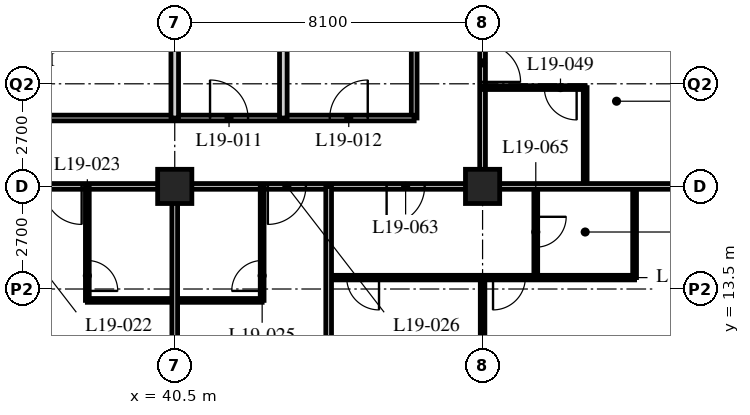
"""IFC4 building model, lengths in metres.
Left out: names, types, materials, properties, quantities, classifications, styles, units other than length and angle.
Written with IfcOpenShell. Run it as: python <this file> out.ifc"""

import sys

from ifc_helpers import new_model, si_unit, direction, frame, frame_2d, origin, origin_2d, place, context, subcontext, project, spatial, rectangle, hollow_rectangle, extrude, element, fill, save


model = new_model("IFC4")
c1 = context("Model", 3, precision=1e-05, world=origin(), true_north=direction((0.0, 1.0)))
c2 = subcontext(c1, "Body", "Model", "MODEL_VIEW")
j1 = project(units=[si_unit("LENGTHUNIT", "METRE"), si_unit("PLANEANGLEUNIT", "RADIAN")], contexts=[c1])
p1 = place(None, origin())
s1 = spatial("IfcSite", under=j1, at=p1, CompositionType="ELEMENT")
p2 = place(p1, origin())
s2 = spatial("IfcBuilding", under=s1, at=p2, CompositionType="ELEMENT")
p3 = place(p2, frame((0.0, 0.0, 77.2)))
s3 = spatial("IfcBuildingStorey", under=s2, at=p3, CompositionType="ELEMENT", Elevation=77.2)
for number, where, z_axis, x_axis in (
    (1, (40.5, 16.2, 0.0), (0.0, 0.0, 1.0), (1.0, 0.0, 0.0)),
    (2, (48.6, 16.2, 0.0), (0.0, 0.0, 1.0), (1.0, 0.0, 0.0)),
):
    element("IfcColumn", number, at=place(p3, frame(where, z_axis=z_axis, x_axis=x_axis)), inside=s3, PredefinedType="COLUMN", context=c2, shape_type="SweptSolid", body=[
        extrude(hollow_rectangle(XDim=0.9, YDim=0.9, WallThickness=0.09, at=origin_2d()), origin(), (0.0, 0.0, 1.0), 3.4),
    ])
p4 = place(p3, frame((12.15, 16.2, 0.0), z_axis=(0.0, 0.0, 1.0), x_axis=(1.0, 0.0, 0.0)))
e3 = element("IfcWall", 3, at=p4, inside=s3, PredefinedType="PARTITIONING", context=c2, shape_type="SweptSolid", body=[
    extrude(rectangle(XDim=36.45, YDim=0.15, at=frame_2d((18.225, 0.0))), origin(), (0.0, 0.0, 1.0), 2.428),
])
p5 = place(p4, frame((6.5, 0.0, 0.0)))
e4 = element("IfcOpeningElement", 4, at=p5, cuts=e3, PredefinedType="OPENING", context=c2, shape_type="SweptSolid", body=[
    extrude(rectangle(XDim=1.0, YDim=2.1, at=frame_2d((0.5, 1.05))), frame((0.0, 0.085, 0.0), z_axis=(0.0, -1.0, 0.0), x_axis=(1.0, 0.0, 0.0)), (0.0, 0.0, 1.0), 0.17),
])
p6 = place(p4, frame((8.4, 0.0, 0.0)))
e5 = element("IfcOpeningElement", 5, at=p6, cuts=e3, PredefinedType="OPENING", context=c2, shape_type="SweptSolid", body=[
    extrude(rectangle(XDim=1.0, YDim=2.1, at=frame_2d((0.5, 1.05))), frame((0.0, 0.085, 0.0), z_axis=(0.0, -1.0, 0.0), x_axis=(1.0, 0.0, 0.0)), (0.0, 0.0, 1.0), 0.17),
])
p7 = place(p4, frame((14.9, 0.0, 0.0)))
e6 = element("IfcOpeningElement", 6, at=p7, cuts=e3, PredefinedType="OPENING", context=c2, shape_type="SweptSolid", body=[
    extrude(rectangle(XDim=1.0, YDim=2.1, at=frame_2d((0.5, 1.05))), frame((0.0, 0.085, 0.0), z_axis=(0.0, -1.0, 0.0), x_axis=(1.0, 0.0, 0.0)), (0.0, 0.0, 1.0), 0.17),
])
p8 = place(p4, frame((16.5, 0.0, 0.0)))
e7 = element("IfcOpeningElement", 7, at=p8, cuts=e3, PredefinedType="OPENING", context=c2, shape_type="SweptSolid", body=[
    extrude(rectangle(XDim=1.0, YDim=2.1, at=frame_2d((0.5, 1.05))), frame((0.0, 0.085, 0.0), z_axis=(0.0, -1.0, 0.0), x_axis=(1.0, 0.0, 0.0)), (0.0, 0.0, 1.0), 0.17),
])
p9 = place(p4, frame((22.7, 0.0, 0.0)))
e8 = element("IfcOpeningElement", 8, at=p9, cuts=e3, PredefinedType="OPENING", context=c2, shape_type="SweptSolid", body=[
    extrude(rectangle(XDim=1.0, YDim=2.1, at=frame_2d((0.5, 1.05))), frame((0.0, 0.085, 0.0), z_axis=(0.0, -1.0, 0.0), x_axis=(1.0, 0.0, 0.0)), (0.0, 0.0, 1.0), 0.17),
])
p10 = place(p4, frame((24.9, 0.0, 0.0)))
e9 = element("IfcOpeningElement", 9, at=p10, cuts=e3, PredefinedType="OPENING", context=c2, shape_type="SweptSolid", body=[
    extrude(rectangle(XDim=1.0, YDim=2.1, at=frame_2d((0.5, 1.05))), frame((0.0, 0.085, 0.0), z_axis=(0.0, -1.0, 0.0), x_axis=(1.0, 0.0, 0.0)), (0.0, 0.0, 1.0), 0.17),
])
p11 = place(p4, frame((30.8, 0.0, 0.0)))
e10 = element("IfcOpeningElement", 10, at=p11, cuts=e3, PredefinedType="OPENING", context=c2, shape_type="SweptSolid", body=[
    extrude(rectangle(XDim=1.0, YDim=2.1, at=frame_2d((0.5, 1.05))), frame((0.0, 0.085, 0.0), z_axis=(0.0, -1.0, 0.0), x_axis=(1.0, 0.0, 0.0)), (0.0, 0.0, 1.0), 0.17),
])
p12 = place(p4, frame((1.525, 0.0, 0.0)))
e11 = element("IfcOpeningElement", 11, at=p12, cuts=e3, PredefinedType="OPENING", context=c2, shape_type="SweptSolid", body=[
    extrude(rectangle(XDim=1.0, YDim=2.1, at=frame_2d((0.5, 1.05))), frame((0.0, 0.085, 0.0), z_axis=(0.0, -1.0, 0.0), x_axis=(1.0, 0.0, 0.0)), (0.0, 0.0, 1.0), 0.17),
])
p13 = place(p4, frame((33.925, 0.0, 0.0)))
e12 = element("IfcOpeningElement", 12, at=p13, cuts=e3, PredefinedType="OPENING", context=c2, shape_type="SweptSolid", body=[
    extrude(rectangle(XDim=1.0, YDim=2.1, at=frame_2d((0.5, 1.05))), frame((0.0, 0.085, 0.0), z_axis=(0.0, -1.0, 0.0), x_axis=(1.0, 0.0, 0.0)), (0.0, 0.0, 1.0), 0.17),
])
p14 = place(p3, frame((48.6, 16.2, 0.0), z_axis=(0.0, 0.0, 1.0), x_axis=(0.0, 1.0, 0.0)))
e13 = element("IfcWall", 13, at=p14, inside=s3, PredefinedType="PARTITIONING", context=c2, shape_type="SweptSolid", body=[
    extrude(rectangle(XDim=26.1, YDim=0.15, at=frame_2d((13.05, 0.0))), origin(), (0.0, 0.0, 1.0), 2.428),
])
p15 = place(p14, frame((2.75, 0.0, 0.0)))
e14 = element("IfcOpeningElement", 14, at=p15, cuts=e13, PredefinedType="OPENING", context=c2, shape_type="SweptSolid", body=[
    extrude(rectangle(XDim=1.0, YDim=2.1, at=frame_2d((0.5, 1.05))), frame((0.0, 0.085, 0.0), z_axis=(0.0, -1.0, 0.0), x_axis=(1.0, 0.0, 0.0)), (0.0, 0.0, 1.0), 0.17),
])
p16 = place(p14, frame((4.65, 0.0, 0.0)))
e15 = element("IfcOpeningElement", 15, at=p16, cuts=e13, PredefinedType="OPENING", context=c2, shape_type="SweptSolid", body=[
    extrude(rectangle(XDim=1.0, YDim=2.1, at=frame_2d((0.5, 1.05))), frame((0.0, 0.085, 0.0), z_axis=(0.0, -1.0, 0.0), x_axis=(1.0, 0.0, 0.0)), (0.0, 0.0, 1.0), 0.17),
])
p17 = place(p14, frame((13.55, 0.0, 0.0)))
e16 = element("IfcOpeningElement", 16, at=p17, cuts=e13, PredefinedType="OPENING", context=c2, shape_type="SweptSolid", body=[
    extrude(rectangle(XDim=1.0, YDim=2.1, at=frame_2d((0.5, 1.05))), frame((0.0, 0.085, 0.0), z_axis=(0.0, -1.0, 0.0), x_axis=(1.0, 0.0, 0.0)), (0.0, 0.0, 1.0), 0.17),
])
p18 = place(p14, frame((21.65, 0.0, 0.0)))
e17 = element("IfcOpeningElement", 17, at=p18, cuts=e13, PredefinedType="OPENING", context=c2, shape_type="SweptSolid", body=[
    extrude(rectangle(XDim=1.0, YDim=2.1, at=frame_2d((0.5, 1.05))), frame((0.0, 0.085, 0.0), z_axis=(0.0, -1.0, 0.0), x_axis=(1.0, 0.0, 0.0)), (0.0, 0.0, 1.0), 0.17),
])
p19 = place(p3, frame((46.8, 18.0, 0.0), z_axis=(0.0, 0.0, 1.0), x_axis=(0.0, 1.0, 0.0)))
e18 = element("IfcWall", 18, at=p19, inside=s3, PredefinedType="PARTITIONING", context=c2, shape_type="SweptSolid", body=[
    extrude(rectangle(XDim=22.5, YDim=0.15, at=frame_2d((11.25, 0.0))), origin(), (0.0, 0.0, 1.0), 3.19),
])
p20 = place(p19, frame((7.229, 0.0, 0.0)))
e19 = element("IfcOpeningElement", 19, at=p20, cuts=e18, PredefinedType="OPENING", context=c2, shape_type="SweptSolid", body=[
    extrude(rectangle(XDim=1.0, YDim=2.1, at=frame_2d((0.5, 1.05))), frame((0.0, 0.085, 0.0), z_axis=(0.0, -1.0, 0.0), x_axis=(1.0, 0.0, 0.0)), (0.0, 0.0, 1.0), 0.17),
])
p21 = place(p19, frame((11.279, 0.0, 0.0)))
e20 = element("IfcOpeningElement", 20, at=p21, cuts=e18, PredefinedType="OPENING", context=c2, shape_type="SweptSolid", body=[
    extrude(rectangle(XDim=1.0, YDim=2.1, at=frame_2d((0.5, 1.05))), frame((0.0, 0.085, 0.0), z_axis=(0.0, -1.0, 0.0), x_axis=(1.0, 0.0, 0.0)), (0.0, 0.0, 1.0), 0.17),
])
p22 = place(p19, frame((14.7, 0.0, 0.0)))
e21 = element("IfcOpeningElement", 21, at=p22, cuts=e18, PredefinedType="OPENING", context=c2, shape_type="SweptSolid", body=[
    extrude(rectangle(XDim=1.0, YDim=2.1, at=frame_2d((0.5, 1.05))), frame((0.0, 0.085, 0.0), z_axis=(0.0, -1.0, 0.0), x_axis=(1.0, 0.0, 0.0)), (0.0, 0.0, 1.0), 0.17),
])
p23 = place(p19, frame((18.75, 0.0, 0.0)))
e22 = element("IfcOpeningElement", 22, at=p23, cuts=e18, PredefinedType="OPENING", context=c2, shape_type="SweptSolid", body=[
    extrude(rectangle(XDim=1.0, YDim=2.1, at=frame_2d((0.5, 1.05))), frame((0.0, 0.085, 0.0), z_axis=(0.0, -1.0, 0.0), x_axis=(1.0, 0.0, 0.0)), (0.0, 0.0, 1.0), 0.17),
])
p24 = place(p3, frame((29.56, 18.0, 0.0), z_axis=(0.0, 0.0, 1.0), x_axis=(1.0, 0.0, 0.0)))
e23 = element("IfcWall", 23, at=p24, inside=s3, PredefinedType="PARTITIONING", context=c2, shape_type="SweptSolid", body=[
    extrude(rectangle(XDim=17.24, YDim=0.15, at=frame_2d((8.62, 0.0))), origin(), (0.0, 0.0, 1.0), 3.19),
])
p25 = place(p24, frame((0.29, 0.0, 0.0)))
e24 = element("IfcOpeningElement", 24, at=p25, cuts=e23, PredefinedType="OPENING", context=c2, shape_type="SweptSolid", body=[
    extrude(rectangle(XDim=1.0, YDim=2.1, at=frame_2d((0.5, 1.05))), frame((0.0, 0.085, 0.0), z_axis=(0.0, -1.0, 0.0), x_axis=(1.0, 0.0, 0.0)), (0.0, 0.0, 1.0), 0.17),
])
p26 = place(p24, frame((5.765, 0.0, 0.0)))
e25 = element("IfcOpeningElement", 25, at=p26, cuts=e23, PredefinedType="OPENING", context=c2, shape_type="SweptSolid", body=[
    extrude(rectangle(XDim=1.0, YDim=2.1, at=frame_2d((0.5, 1.05))), frame((0.0, 0.085, 0.0), z_axis=(0.0, -1.0, 0.0), x_axis=(1.0, 0.0, 0.0)), (0.0, 0.0, 1.0), 0.17),
])
p27 = place(p24, frame((11.869, 0.0, 0.0)))
e26 = element("IfcOpeningElement", 26, at=p27, cuts=e23, PredefinedType="OPENING", context=c2, shape_type="SweptSolid", body=[
    extrude(rectangle(XDim=1.0, YDim=2.1, at=frame_2d((0.5, 1.05))), frame((0.0, 0.085, 0.0), z_axis=(0.0, -1.0, 0.0), x_axis=(1.0, 0.0, 0.0)), (0.0, 0.0, 1.0), 0.17),
])
p28 = place(p24, frame((15.019, 0.0, 0.0)))
e27 = element("IfcOpeningElement", 27, at=p28, cuts=e23, PredefinedType="OPENING", context=c2, shape_type="SweptSolid", body=[
    extrude(rectangle(XDim=1.0, YDim=2.1, at=frame_2d((0.5, 1.05))), frame((0.0, 0.085, 0.0), z_axis=(0.0, -1.0, 0.0), x_axis=(1.0, 0.0, 0.0)), (0.0, 0.0, 1.0), 0.17),
])
p29 = place(p3, frame((40.5, 18.0, 0.0), z_axis=(0.0, 0.0, 1.0), x_axis=(0.0, 1.0, 0.0)))
e28 = element("IfcWall", 28, at=p29, inside=s3, PredefinedType="SOLIDWALL", context=c2, shape_type="SweptSolid", body=[
    extrude(rectangle(XDim=6.3, YDim=0.2, at=frame_2d((3.15, 0.0))), origin(), (0.0, 0.0, 1.0), 2.428),
])
p30 = place(p3, frame((43.357, 18.0, 0.0), z_axis=(0.0, 0.0, 1.0), x_axis=(0.0, 1.0, 0.0)))
e29 = element("IfcWall", 29, at=p30, inside=s3, PredefinedType="SOLIDWALL", context=c2, shape_type="SweptSolid", body=[
    extrude(rectangle(XDim=6.3, YDim=0.2, at=frame_2d((3.15, 0.0))), origin(), (0.0, 0.0, 1.0), 3.19),
])
p31 = place(p3, frame((38.2, 13.2, 0.0), z_axis=(0.0, 0.0, 1.0), x_axis=(1.0, 0.0, 0.0)))
e30 = element("IfcWall", 30, at=p31, inside=s3, PredefinedType="PARTITIONING", context=c2, shape_type="SweptSolid", body=[
    extrude(rectangle(XDim=4.6, YDim=0.1, at=frame_2d((2.3, 0.0))), origin(), (0.0, 0.0, 1.0), 3.19),
])
p32 = place(p3, frame((38.2, 16.2, 0.0), z_axis=(0.0, 0.0, 1.0), x_axis=(0.0, -1.0, 0.0)))
e31 = element("IfcWall", 31, at=p32, inside=s3, PredefinedType="PARTITIONING", context=c2, shape_type="SweptSolid", body=[
    extrude(rectangle(XDim=3.0, YDim=0.1, at=frame_2d((1.5, 0.0))), origin(), (0.0, 0.0, 1.0), 3.19),
])
p33 = place(p32, frame((1.95, 0.0, 0.0)))
e32 = element("IfcOpeningElement", 32, at=p33, cuts=e31, PredefinedType="OPENING", context=c2, shape_type="SweptSolid", body=[
    extrude(rectangle(XDim=0.8, YDim=2.1, at=frame_2d((0.4, 1.05))), frame((0.0, 0.06, 0.0), z_axis=(0.0, -1.0, 0.0), x_axis=(1.0, 0.0, 0.0)), (0.0, 0.0, 1.0), 0.12),
])
p34 = place(p3, frame((40.5, 16.2, 0.0), z_axis=(0.0, 0.0, 1.0), x_axis=(0.0, -1.0, 0.0)))
e33 = element("IfcWall", 33, at=p34, inside=s3, PredefinedType="PARTITIONING", context=c2, shape_type="SweptSolid", body=[
    extrude(rectangle(XDim=15.9, YDim=0.15, at=frame_2d((7.95, 0.0))), origin(), (0.0, 0.0, 1.0), 2.428),
])
p35 = place(p3, frame((42.8, 16.2, 0.0), z_axis=(0.0, 0.0, 1.0), x_axis=(0.0, -1.0, 0.0)))
e34 = element("IfcWall", 34, at=p35, inside=s3, PredefinedType="PARTITIONING", context=c2, shape_type="SweptSolid", body=[
    extrude(rectangle(XDim=3.0, YDim=0.1, at=frame_2d((1.5, 0.0))), origin(), (0.0, 0.0, 1.0), 3.19),
])
p36 = place(p35, frame((1.95, 0.0, 0.0)))
e35 = element("IfcOpeningElement", 35, at=p36, cuts=e34, PredefinedType="OPENING", context=c2, shape_type="SweptSolid", body=[
    extrude(rectangle(XDim=0.8, YDim=2.1, at=frame_2d((0.4, 1.05))), frame((0.0, 0.06, 0.0), z_axis=(0.0, -1.0, 0.0), x_axis=(1.0, 0.0, 0.0)), (0.0, 0.0, 1.0), 0.12),
])
p37 = place(p3, frame((51.3, 16.2, 0.0), z_axis=(0.0, 0.0, 1.0), x_axis=(0.0, 1.0, 0.0)))
e36 = element("IfcWall", 36, at=p37, inside=s3, PredefinedType="PARTITIONING", context=c2, shape_type="SweptSolid", body=[
    extrude(rectangle(XDim=2.6, YDim=0.1, at=frame_2d((1.3, 0.0))), origin(), (0.0, 0.0, 1.0), 3.19),
])
p38 = place(p3, frame((48.6, 18.8, 0.0), z_axis=(0.0, 0.0, 1.0), x_axis=(1.0, 0.0, 0.0)))
e37 = element("IfcWall", 37, at=p38, inside=s3, PredefinedType="PARTITIONING", context=c2, shape_type="SweptSolid", body=[
    extrude(rectangle(XDim=2.7, YDim=0.1, at=frame_2d((1.35, 0.0))), origin(), (0.0, 0.0, 1.0), 3.19),
])
p39 = place(p38, frame((1.625, 0.0, 0.0)))
e38 = element("IfcOpeningElement", 38, at=p39, cuts=e37, PredefinedType="OPENING", context=c2, shape_type="SweptSolid", body=[
    extrude(rectangle(XDim=0.85, YDim=2.1, at=frame_2d((0.425, 1.05))), frame((0.0, 0.06, 0.0), z_axis=(0.0, -1.0, 0.0), x_axis=(1.0, 0.0, 0.0)), (0.0, 0.0, 1.0), 0.12),
])
p40 = place(p3, frame((44.55, 13.8, 0.0), z_axis=(0.0, 0.0, 1.0), x_axis=(1.0, 0.0, 0.0)))
e39 = element("IfcWall", 39, at=p40, inside=s3, PredefinedType="PARTITIONING", context=c2, shape_type="SweptSolid", body=[
    extrude(rectangle(XDim=8.05, YDim=0.12, at=frame_2d((4.025, 0.0))), origin(), (0.0, 0.0, 1.0), 3.19),
])
p41 = place(p40, frame((0.475, 0.0, 0.0)))
e40 = element("IfcOpeningElement", 40, at=p41, cuts=e39, PredefinedType="OPENING", context=c2, shape_type="SweptSolid", body=[
    extrude(rectangle(XDim=0.85, YDim=2.1, at=frame_2d((0.425, 1.05))), frame((0.0, 0.07, 0.0), z_axis=(0.0, -1.0, 0.0), x_axis=(1.0, 0.0, 0.0)), (0.0, 0.0, 1.0), 0.14),
])
p42 = place(p40, frame((4.325, 0.0, 0.0)))
e41 = element("IfcOpeningElement", 41, at=p42, cuts=e39, PredefinedType="OPENING", context=c2, shape_type="SweptSolid", body=[
    extrude(rectangle(XDim=0.85, YDim=2.1, at=frame_2d((0.425, 1.05))), frame((0.0, 0.07, 0.0), z_axis=(0.0, -1.0, 0.0), x_axis=(1.0, 0.0, 0.0)), (0.0, 0.0, 1.0), 0.14),
])
p43 = place(p3, frame((50.0, 16.2, 0.0), z_axis=(0.0, 0.0, 1.0), x_axis=(0.0, -1.0, 0.0)))
e42 = element("IfcWall", 42, at=p43, inside=s3, PredefinedType="PARTITIONING", context=c2, shape_type="SweptSolid", body=[
    extrude(rectangle(XDim=2.4, YDim=0.1, at=frame_2d((1.2, 0.0))), origin(), (0.0, 0.0, 1.0), 3.19),
])
p44 = place(p43, frame((0.8, 0.0, 0.0)))
e43 = element("IfcOpeningElement", 43, at=p44, cuts=e42, PredefinedType="OPENING", context=c2, shape_type="SweptSolid", body=[
    extrude(rectangle(XDim=0.8, YDim=2.1, at=frame_2d((0.4, 1.05))), frame((0.0, 0.06, 0.0), z_axis=(0.0, -1.0, 0.0), x_axis=(1.0, 0.0, 0.0)), (0.0, 0.0, 1.0), 0.12),
])
p45 = place(p3, frame((52.6, 16.2, 0.0), z_axis=(0.0, 0.0, 1.0), x_axis=(0.0, -1.0, 0.0)))
e44 = element("IfcWall", 44, at=p45, inside=s3, PredefinedType="PARTITIONING", context=c2, shape_type="SweptSolid", body=[
    extrude(rectangle(XDim=2.4, YDim=0.1, at=frame_2d((1.2, 0.0))), origin(), (0.0, 0.0, 1.0), 3.19),
])
p46 = place(p3, frame((48.6, 13.8, 0.0), z_axis=(0.0, 0.0, 1.0), x_axis=(0.0, -1.0, 0.0)))
e45 = element("IfcWall", 45, at=p46, inside=s3, PredefinedType="PARTITIONING", context=c2, shape_type="SweptSolid", body=[
    extrude(rectangle(XDim=9.45, YDim=0.12, at=frame_2d((4.725, 0.0))), origin(), (0.0, 0.0, 1.0), 2.428),
])
p47 = place(p3, frame((48.6, 16.2, 0.0), z_axis=(0.0, 0.0, 1.0), x_axis=(1.0, 0.0, 0.0)))
e46 = element("IfcWall", 46, at=p47, inside=s3, PredefinedType="PARTITIONING", context=c2, shape_type="SweptSolid", body=[
    extrude(rectangle(XDim=7.8, YDim=0.15, at=frame_2d((3.9, 0.0))), origin(), (0.0, 0.0, 1.0), 2.428),
])
p48 = place(p3, frame((44.55, 16.2, 0.0), z_axis=(0.0, 0.0, 1.0), x_axis=(0.0, -1.0, 0.0)))
e47 = element("IfcWall", 47, at=p48, inside=s3, PredefinedType="PARTITIONING", context=c2, shape_type="SweptSolid", body=[
    extrude(rectangle(XDim=15.9, YDim=0.15, at=frame_2d((7.95, 0.0))), origin(), (0.0, 0.0, 1.0), 3.19),
])
p49 = place(p27, origin())
e48 = element("IfcDoor", 48, at=p49, inside=s3, OperationType="SINGLE_SWING_LEFT", PredefinedType="DOOR", context=c2, shape_type="SweptSolid", body=[
    extrude(rectangle(XDim=1.0, YDim=2.1, at=frame_2d((0.5, 1.05))), frame((0.0, 0.025, 0.0), z_axis=(0.0, -1.0, 0.0), x_axis=(1.0, 0.0, 0.0)), (0.0, 0.0, 1.0), 0.05),
])
fill(e26, e48)
p50 = place(p28, origin())
e49 = element("IfcDoor", 49, at=p50, inside=s3, OperationType="SINGLE_SWING_RIGHT", PredefinedType="DOOR", context=c2, shape_type="SweptSolid", body=[
    extrude(rectangle(XDim=1.0, YDim=2.1, at=frame_2d((0.5, 1.05))), frame((0.0, 0.025, 0.0), z_axis=(0.0, -1.0, 0.0), x_axis=(1.0, 0.0, 0.0)), (0.0, 0.0, 1.0), 0.05),
])
fill(e27, e49)
p51 = place(p33, origin())
e50 = element("IfcDoor", 50, at=p51, inside=s3, OperationType="SINGLE_SWING_RIGHT", PredefinedType="DOOR", context=c2, shape_type="SweptSolid", body=[
    extrude(rectangle(XDim=0.8, YDim=2.1, at=frame_2d((0.4, 1.05))), frame((0.0, 0.025, 0.0), z_axis=(0.0, -1.0, 0.0), x_axis=(1.0, 0.0, 0.0)), (0.0, 0.0, 1.0), 0.05),
])
fill(e32, e50)
p52 = place(p10, origin())
e51 = element("IfcDoor", 51, at=p52, inside=s3, OperationType="SINGLE_SWING_LEFT", PredefinedType="DOOR", context=c2, shape_type="SweptSolid", body=[
    extrude(rectangle(XDim=1.0, YDim=2.1, at=frame_2d((0.5, 1.05))), frame((0.0, 0.025, 0.0), z_axis=(0.0, -1.0, 0.0), x_axis=(1.0, 0.0, 0.0)), (0.0, 0.0, 1.0), 0.05),
])
fill(e9, e51)
p53 = place(p36, origin())
e52 = element("IfcDoor", 52, at=p53, inside=s3, OperationType="SINGLE_SWING_LEFT", PredefinedType="DOOR", context=c2, shape_type="SweptSolid", body=[
    extrude(rectangle(XDim=0.8, YDim=2.1, at=frame_2d((0.4, 1.05))), frame((0.0, 0.025, 0.0), z_axis=(0.0, -1.0, 0.0), x_axis=(1.0, 0.0, 0.0)), (0.0, 0.0, 1.0), 0.05),
])
fill(e35, e52)
p54 = place(p11, origin())
e53 = element("IfcDoor", 53, at=p54, inside=s3, OperationType="SINGLE_SWING_RIGHT", PredefinedType="DOOR", context=c2, shape_type="SweptSolid", body=[
    extrude(rectangle(XDim=1.0, YDim=2.1, at=frame_2d((0.5, 1.05))), frame((0.0, 0.025, 0.0), z_axis=(0.0, -1.0, 0.0), x_axis=(1.0, 0.0, 0.0)), (0.0, 0.0, 1.0), 0.05),
])
fill(e10, e53)
p55 = place(p39, origin())
e54 = element("IfcDoor", 54, at=p55, inside=s3, OperationType="SINGLE_SWING_LEFT", PredefinedType="DOOR", context=c2, shape_type="SweptSolid", body=[
    extrude(rectangle(XDim=0.85, YDim=2.1, at=frame_2d((0.425, 1.05))), frame((0.0, 0.025, 0.0), z_axis=(0.0, -1.0, 0.0), x_axis=(1.0, 0.0, 0.0)), (0.0, 0.0, 1.0), 0.05),
])
fill(e38, e54)
p56 = place(p15, origin())
e55 = element("IfcDoor", 55, at=p56, inside=s3, OperationType="SINGLE_SWING_RIGHT", PredefinedType="DOOR", context=c2, shape_type="SweptSolid", body=[
    extrude(rectangle(XDim=1.0, YDim=2.1, at=frame_2d((0.5, 1.05))), frame((0.0, 0.025, 0.0), z_axis=(0.0, -1.0, 0.0), x_axis=(1.0, 0.0, 0.0)), (0.0, 0.0, 1.0), 0.05),
])
fill(e14, e55)
p57 = place(p13, origin())
e56 = element("IfcDoor", 56, at=p57, inside=s3, OperationType="SINGLE_SWING_RIGHT", PredefinedType="DOOR", context=c2, shape_type="SweptSolid", body=[
    extrude(rectangle(XDim=1.0, YDim=2.1, at=frame_2d((0.5, 1.05))), frame((0.0, 0.025, 0.0), z_axis=(0.0, -1.0, 0.0), x_axis=(1.0, 0.0, 0.0)), (0.0, 0.0, 1.0), 0.05),
])
fill(e12, e56)
p58 = place(p41, origin())
e57 = element("IfcDoor", 57, at=p58, inside=s3, OperationType="SINGLE_SWING_LEFT", PredefinedType="DOOR", context=c2, shape_type="SweptSolid", body=[
    extrude(rectangle(XDim=0.85, YDim=2.1, at=frame_2d((0.425, 1.05))), frame((0.0, 0.025, 0.0), z_axis=(0.0, -1.0, 0.0), x_axis=(1.0, 0.0, 0.0)), (0.0, 0.0, 1.0), 0.05),
])
fill(e40, e57)
p59 = place(p44, origin())
e58 = element("IfcDoor", 58, at=p59, inside=s3, OperationType="SINGLE_SWING_LEFT", PredefinedType="DOOR", context=c2, shape_type="SweptSolid", body=[
    extrude(rectangle(XDim=0.8, YDim=2.1, at=frame_2d((0.4, 1.05))), frame((0.0, 0.025, 0.0), z_axis=(0.0, -1.0, 0.0), x_axis=(1.0, 0.0, 0.0)), (0.0, 0.0, 1.0), 0.05),
])
fill(e43, e58)
p60 = place(p42, origin())
e59 = element("IfcDoor", 59, at=p60, inside=s3, OperationType="SINGLE_SWING_RIGHT", PredefinedType="DOOR", context=c2, shape_type="SweptSolid", body=[
    extrude(rectangle(XDim=0.85, YDim=2.1, at=frame_2d((0.425, 1.05))), frame((0.0, 0.025, 0.0), z_axis=(0.0, -1.0, 0.0), x_axis=(1.0, 0.0, 0.0)), (0.0, 0.0, 1.0), 0.05),
])
fill(e41, e59)
save(model, sys.argv[1])
